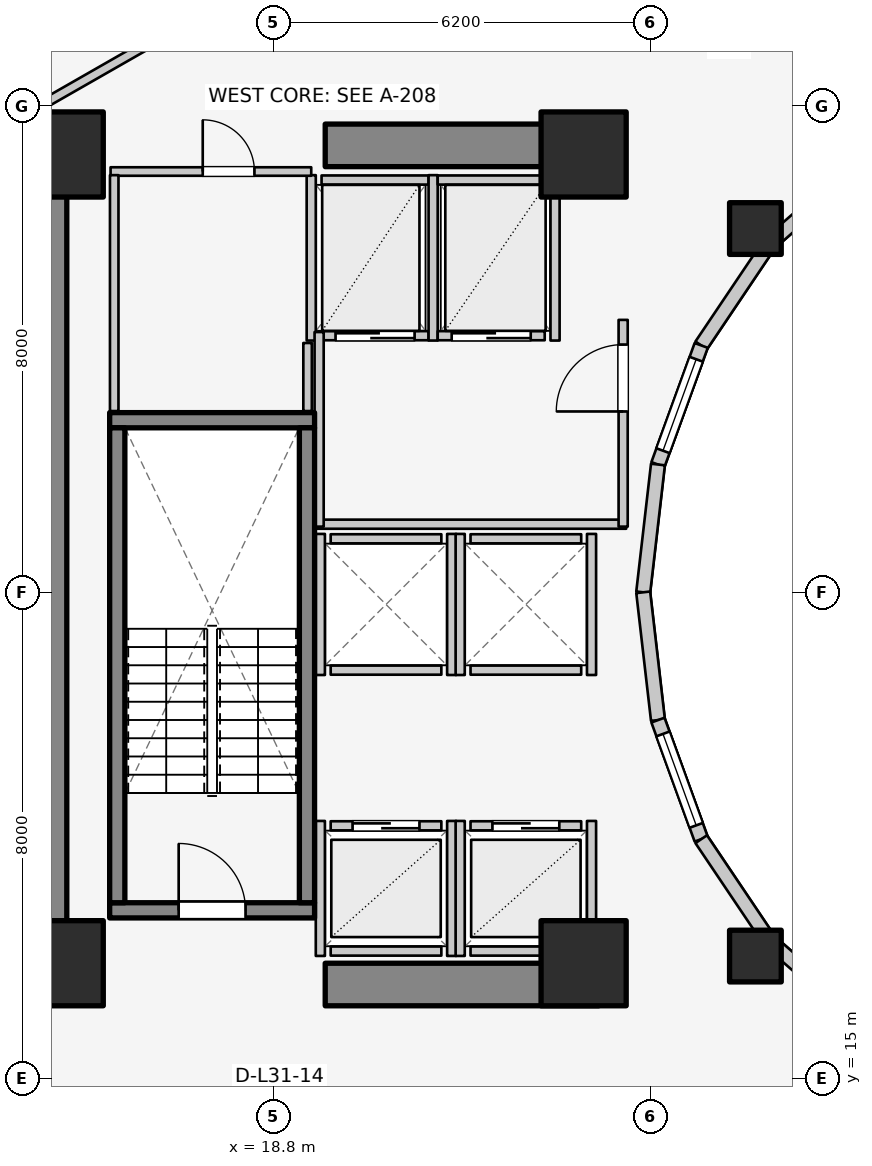
"""IFC4 building model, lengths in metres.
Left out: names, types, materials, properties, quantities, classifications, styles, units other than length and angle.
Written with IfcOpenShell. Run it as: python <this file> out.ifc"""

import sys

from ifc_helpers import new_model, si_unit, direction, frame, frame_2d, origin, origin_2d, place, context, subcontext, project, spatial, rectangle, extrude, element, fill, save


model = new_model("IFC4")
c1 = context("Model", 3, precision=1e-05, world=origin(), true_north=direction((0.0, 1.0)))
c2 = subcontext(c1, "Body", "Model", "MODEL_VIEW")
j1 = project(units=[si_unit("LENGTHUNIT", "METRE"), si_unit("PLANEANGLEUNIT", "RADIAN")], contexts=[c1])
p1 = place(None, origin())
s1 = spatial("IfcSite", under=j1, at=p1, CompositionType="ELEMENT")
p2 = place(p1, origin())
s2 = spatial("IfcBuilding", under=s1, at=p2, CompositionType="ELEMENT")
p3 = place(p2, frame((0.0, 0.0, 104.2)))
s3 = spatial("IfcBuildingStorey", under=s2, at=p3, CompositionType="ELEMENT", Elevation=104.2)
p4 = place(p3, frame((15.05, 17.05, 0.0), z_axis=(0.0, 0.0, 1.0), x_axis=(0.0, 1.0, 0.0)))
e1 = element("IfcWall", 1, at=p4, inside=s3, PredefinedType="SHEAR", context=c2, shape_type="SweptSolid", body=[
    extrude(rectangle(XDim=12.8, YDim=0.7, at=frame_2d((6.4, 0.0))), origin(), (0.0, 0.0, 1.0), 3.1),
])
for number, where, z_axis, x_axis in (
    (2, (19.65, 16.55, 0.0), (0.0, 0.0, 1.0), (1.0, 0.0, 0.0)),
    (3, (19.65, 30.35, 0.0), (0.0, 0.0, 1.0), (1.0, 0.0, 0.0)),
):
    element("IfcWall", number, at=place(p3, frame(where, z_axis=z_axis, x_axis=x_axis)), inside=s3, PredefinedType="SHEAR", context=c2, shape_type="SweptSolid", body=[
        extrude(rectangle(XDim=4.5, YDim=0.7, at=frame_2d((2.25, 0.0))), origin(), (0.0, 0.0, 1.0), 3.1),
    ])
p5 = place(p3, frame((16.105, 17.77, 0.0), z_axis=(0.0, 0.0, 1.0), x_axis=(1.0, 0.0, 0.0)))
e4 = element("IfcWall", 4, at=p5, inside=s3, PredefinedType="SOLIDWALL", context=c2, shape_type="SweptSolid", body=[
    extrude(rectangle(XDim=3.37, YDim=0.25, at=frame_2d((1.685, 0.0))), origin(), (0.0, 0.0, 1.0), 3.1),
])
p6 = place(p5, frame((1.135, 0.0, 0.0)))
e5 = element("IfcOpeningElement", 5, at=p6, cuts=e4, PredefinedType="OPENING", context=c2, shape_type="SweptSolid", body=[
    extrude(rectangle(XDim=1.1, YDim=2.1, at=frame_2d((0.55, 1.05))), frame((0.0, 0.135, 0.0), z_axis=(0.0, -1.0, 0.0), x_axis=(1.0, 0.0, 0.0)), (0.0, 0.0, 1.0), 0.27),
])
p7 = place(p3, frame((16.105, 25.83, 0.0), z_axis=(0.0, 0.0, 1.0), x_axis=(1.0, 0.0, 0.0)))
e6 = element("IfcWall", 6, at=p7, inside=s3, PredefinedType="SOLIDWALL", context=c2, shape_type="SweptSolid", body=[
    extrude(rectangle(XDim=3.37, YDim=0.25, at=frame_2d((1.685, 0.0))), origin(), (0.0, 0.0, 1.0), 3.1),
])
for number, where, z_axis, x_axis in (
    (7, (16.23, 17.895, 0.0), (0.0, 0.0, 1.0), (0.0, 1.0, 0.0)),
    (8, (19.35, 17.895, 0.0), (0.0, 0.0, 1.0), (0.0, 1.0, 0.0)),
):
    element("IfcWall", number, at=place(p3, frame(where, z_axis=z_axis, x_axis=x_axis)), inside=s3, PredefinedType="SOLIDWALL", context=c2, shape_type="SweptSolid", body=[
        extrude(rectangle(XDim=7.81, YDim=0.25, at=frame_2d((3.905, 0.0))), origin(), (0.0, 0.0, 1.0), 3.1),
    ])
for number, where, z_axis, x_axis in (
    (9, (15.3, 16.9, 0.0), (0.0, 0.0, 1.0), (1.0, 0.0, 0.0)),
    (10, (23.9, 16.9, 0.0), (0.0, 0.0, 1.0), (1.0, 0.0, 0.0)),
    (11, (23.9, 30.2, 0.0), (0.0, 0.0, 1.0), (1.0, 0.0, 0.0)),
    (12, (15.3, 30.2, 0.0), (0.0, 0.0, 1.0), (1.0, 0.0, 0.0)),
):
    element("IfcColumn", number, at=place(p3, frame(where, z_axis=z_axis, x_axis=x_axis)), inside=s3, PredefinedType="COLUMN", context=c2, shape_type="SweptSolid", body=[
        extrude(rectangle(XDim=1.4, YDim=1.4, at=origin_2d()), origin(), (0.0, 0.0, 1.0), 3.1),
    ])
for number, where, z_axis, x_axis in (
    (13, (26.725, 28.982, 0.0), (0.0, 0.0, 1.0), (1.0, 0.0, 0.0)),
    (14, (26.725, 17.018, 0.0), (0.0, 0.0, 1.0), (1.0, 0.0, 0.0)),
):
    element("IfcColumn", number, at=place(p3, frame(where, z_axis=z_axis, x_axis=x_axis)), inside=s3, PredefinedType="COLUMN", context=c2, shape_type="SweptSolid", body=[
        extrude(rectangle(XDim=0.85, YDim=0.85, at=origin_2d()), origin(), (0.0, 0.0, 1.0), 3.1),
    ])
p8 = place(p3, frame((28.44, 30.032, 0.0), z_axis=(0.0, 0.0, 1.0), x_axis=(-0.752576694707, -0.658504607869, 0.0)))
e15 = element("IfcWall", 15, at=p8, inside=s3, PredefinedType="STANDARD", context=c2, shape_type="SweptSolid", body=[
    extrude(rectangle(XDim=1.959, YDim=0.23, at=frame_2d((0.98, 0.0))), origin(), (0.0, 0.0, 1.0), 2.16),
])
p9 = place(p3, frame((26.965, 28.742, 0.0), z_axis=(0.0, 0.0, 1.0), x_axis=(-0.558197800898, -0.829707909492, 0.0)))
e16 = element("IfcWall", 16, at=p9, inside=s3, PredefinedType="STANDARD", context=c2, shape_type="SweptSolid", body=[
    extrude(rectangle(XDim=2.027, YDim=0.23, at=frame_2d((1.013, 0.0))), origin(), (0.0, 0.0, 1.0), 2.16),
])
p10 = place(p3, frame((25.834, 27.06, 0.0), z_axis=(0.0, 0.0, 1.0), x_axis=(-0.341423187295, -0.93990968033, 0.0)))
e17 = element("IfcWall", 17, at=p10, inside=s3, PredefinedType="STANDARD", context=c2, shape_type="SweptSolid", body=[
    extrude(rectangle(XDim=2.084, YDim=0.23, at=frame_2d((1.042, 0.0))), origin(), (0.0, 0.0, 1.0), 2.84),
])
p11 = place(p10, frame((0.242, 0.0, 0.85)))
e18 = element("IfcOpeningElement", 18, at=p11, cuts=e17, PredefinedType="OPENING", context=c2, shape_type="SweptSolid", body=[
    extrude(rectangle(XDim=1.6, YDim=1.65, at=frame_2d((0.8, 0.825))), frame((0.0, 0.125, 0.0), z_axis=(0.0, -1.0, 0.0), x_axis=(1.0, 0.0, 0.0)), (0.0, 0.0, 1.0), 0.25),
])
for number, where, z_axis, x_axis in (
    (19, (25.123, 25.102, 0.0), (0.0, 0.0, 1.0), (-0.115, -0.993, 0.0)),
    (20, (24.88, 23.0, 0.0), (0.0, 0.0, 1.0), (0.115, -0.993, 0.0)),
):
    element("IfcWall", number, at=place(p3, frame(where, z_axis=z_axis, x_axis=x_axis)), inside=s3, PredefinedType="STANDARD", context=c2, shape_type="SweptSolid", body=[
        extrude(rectangle(XDim=2.115, YDim=0.23, at=frame_2d((1.058, 0.0))), origin(), (0.0, 0.0, 1.0), 2.84),
    ])
p12 = place(p3, frame((25.123, 20.898, 0.0), z_axis=(0.0, 0.0, 1.0), x_axis=(0.341423187295, -0.93990968033, 0.0)))
e21 = element("IfcWall", 21, at=p12, inside=s3, PredefinedType="STANDARD", context=c2, shape_type="SweptSolid", body=[
    extrude(rectangle(XDim=2.084, YDim=0.23, at=frame_2d((1.042, 0.0))), origin(), (0.0, 0.0, 1.0), 2.84),
])
p13 = place(p12, frame((0.242, 0.0, 0.85)))
e22 = element("IfcOpeningElement", 22, at=p13, cuts=e21, PredefinedType="OPENING", context=c2, shape_type="SweptSolid", body=[
    extrude(rectangle(XDim=1.6, YDim=1.65, at=frame_2d((0.8, 0.825))), frame((0.0, 0.125, 0.0), z_axis=(0.0, -1.0, 0.0), x_axis=(1.0, 0.0, 0.0)), (0.0, 0.0, 1.0), 0.25),
])
p14 = place(p3, frame((25.834, 18.94, 0.0), z_axis=(0.0, 0.0, 1.0), x_axis=(0.558197800898, -0.829707909492, 0.0)))
e23 = element("IfcWall", 23, at=p14, inside=s3, PredefinedType="STANDARD", context=c2, shape_type="SweptSolid", body=[
    extrude(rectangle(XDim=2.027, YDim=0.23, at=frame_2d((1.013, 0.0))), origin(), (0.0, 0.0, 1.0), 2.16),
])
p15 = place(p3, frame((26.965, 17.258, 0.0), z_axis=(0.0, 0.0, 1.0), x_axis=(0.752576694707, -0.658504607869, 0.0)))
e24 = element("IfcWall", 24, at=p15, inside=s3, PredefinedType="STANDARD", context=c2, shape_type="SweptSolid", body=[
    extrude(rectangle(XDim=1.959, YDim=0.23, at=frame_2d((0.98, 0.0))), origin(), (0.0, 0.0, 1.0), 2.16),
])
p16 = place(p3, frame((19.74, 19.16, 0.0), z_axis=(0.0, 0.0, 1.0), x_axis=(1.0, 0.0, 0.0)))
e25 = element("IfcWall", 25, at=p16, inside=s3, PredefinedType="SOLIDWALL", context=c2, shape_type="SweptSolid", body=[
    extrude(rectangle(XDim=1.82, YDim=0.15, at=frame_2d((0.91, 0.0))), origin(), (0.0, 0.0, 1.0), 2.855),
])
p17 = place(p16, frame((0.36, 0.0, 0.0)))
e26 = element("IfcOpeningElement", 26, at=p17, cuts=e25, PredefinedType="OPENING", context=c2, shape_type="SweptSolid", body=[
    extrude(rectangle(XDim=1.1, YDim=2.1, at=frame_2d((0.55, 1.05))), frame((0.0, 0.085, 0.0), z_axis=(0.0, -1.0, 0.0), x_axis=(1.0, 0.0, 0.0)), (0.0, 0.0, 1.0), 0.17),
])
p18 = place(p3, frame((19.74, 17.1, 0.0), z_axis=(0.0, 0.0, 1.0), x_axis=(1.0, 0.0, 0.0)))
e27 = element("IfcWall", 27, at=p18, inside=s3, PredefinedType="SOLIDWALL", context=c2, shape_type="SweptSolid", body=[
    extrude(rectangle(XDim=1.82, YDim=0.15, at=frame_2d((0.91, 0.0))), origin(), (0.0, 0.0, 1.0), 2.855),
])
p19 = place(p3, frame((19.57, 17.02, 0.0), z_axis=(0.0, 0.0, 1.0), x_axis=(0.0, 1.0, 0.0)))
e28 = element("IfcWall", 28, at=p19, inside=s3, PredefinedType="SOLIDWALL", context=c2, shape_type="SweptSolid", body=[
    extrude(rectangle(XDim=2.22, YDim=0.15, at=frame_2d((1.11, 0.0))), origin(), (0.0, 0.0, 1.0), 2.12),
])
p20 = place(p3, frame((21.73, 17.02, 0.0), z_axis=(0.0, 0.0, 1.0), x_axis=(0.0, 1.0, 0.0)))
e29 = element("IfcWall", 29, at=p20, inside=s3, PredefinedType="SOLIDWALL", context=c2, shape_type="SweptSolid", body=[
    extrude(rectangle(XDim=2.22, YDim=0.15, at=frame_2d((1.11, 0.0))), origin(), (0.0, 0.0, 1.0), 2.855),
])
p21 = place(p3, frame((22.04, 19.16, 0.0), z_axis=(0.0, 0.0, 1.0), x_axis=(1.0, 0.0, 0.0)))
e30 = element("IfcWall", 30, at=p21, inside=s3, PredefinedType="SOLIDWALL", context=c2, shape_type="SweptSolid", body=[
    extrude(rectangle(XDim=1.82, YDim=0.15, at=frame_2d((0.91, 0.0))), origin(), (0.0, 0.0, 1.0), 2.12),
])
p22 = place(p21, frame((0.36, 0.0, 0.0)))
e31 = element("IfcOpeningElement", 31, at=p22, cuts=e30, PredefinedType="OPENING", context=c2, shape_type="SweptSolid", body=[
    extrude(rectangle(XDim=1.1, YDim=2.1, at=frame_2d((0.55, 1.05))), frame((0.0, 0.085, 0.0), z_axis=(0.0, -1.0, 0.0), x_axis=(1.0, 0.0, 0.0)), (0.0, 0.0, 1.0), 0.17),
])
p23 = place(p3, frame((22.04, 17.1, 0.0), z_axis=(0.0, 0.0, 1.0), x_axis=(1.0, 0.0, 0.0)))
e32 = element("IfcWall", 32, at=p23, inside=s3, PredefinedType="SOLIDWALL", context=c2, shape_type="SweptSolid", body=[
    extrude(rectangle(XDim=1.82, YDim=0.15, at=frame_2d((0.91, 0.0))), origin(), (0.0, 0.0, 1.0), 2.12),
])
p24 = place(p3, frame((21.87, 17.02, 0.0), z_axis=(0.0, 0.0, 1.0), x_axis=(0.0, 1.0, 0.0)))
e33 = element("IfcWall", 33, at=p24, inside=s3, PredefinedType="SOLIDWALL", context=c2, shape_type="SweptSolid", body=[
    extrude(rectangle(XDim=2.22, YDim=0.15, at=frame_2d((1.11, 0.0))), origin(), (0.0, 0.0, 1.0), 2.855),
])
p25 = place(p3, frame((24.03, 17.02, 0.0), z_axis=(0.0, 0.0, 1.0), x_axis=(0.0, 1.0, 0.0)))
e34 = element("IfcWall", 34, at=p25, inside=s3, PredefinedType="SOLIDWALL", context=c2, shape_type="SweptSolid", body=[
    extrude(rectangle(XDim=2.22, YDim=0.15, at=frame_2d((1.11, 0.0))), origin(), (0.0, 0.0, 1.0), 2.12),
])
for number, where, z_axis, x_axis in (
    (35, (19.74, 21.72, 0.0), (0.0, 0.0, 1.0), (1.0, 0.0, 0.0)),
    (36, (19.74, 23.88, 0.0), (0.0, 0.0, 1.0), (1.0, 0.0, 0.0)),
):
    element("IfcWall", number, at=place(p3, frame(where, z_axis=z_axis, x_axis=x_axis)), inside=s3, PredefinedType="SOLIDWALL", context=c2, shape_type="SweptSolid", body=[
        extrude(rectangle(XDim=1.82, YDim=0.15, at=frame_2d((0.91, 0.0))), origin(), (0.0, 0.0, 1.0), 2.855),
    ])
for number, where, z_axis, x_axis in (
    (37, (19.57, 21.64, 0.0), (0.0, 0.0, 1.0), (0.0, 1.0, 0.0)),
    (38, (21.73, 21.64, 0.0), (0.0, 0.0, 1.0), (0.0, 1.0, 0.0)),
):
    element("IfcWall", number, at=place(p3, frame(where, z_axis=z_axis, x_axis=x_axis)), inside=s3, PredefinedType="SOLIDWALL", context=c2, shape_type="SweptSolid", body=[
        extrude(rectangle(XDim=2.32, YDim=0.15, at=frame_2d((1.16, 0.0))), origin(), (0.0, 0.0, 1.0), 2.855),
    ])
for number, where, z_axis, x_axis in (
    (39, (22.04, 21.72, 0.0), (0.0, 0.0, 1.0), (1.0, 0.0, 0.0)),
    (40, (22.04, 23.88, 0.0), (0.0, 0.0, 1.0), (1.0, 0.0, 0.0)),
):
    element("IfcWall", number, at=place(p3, frame(where, z_axis=z_axis, x_axis=x_axis)), inside=s3, PredefinedType="SOLIDWALL", context=c2, shape_type="SweptSolid", body=[
        extrude(rectangle(XDim=1.82, YDim=0.15, at=frame_2d((0.91, 0.0))), origin(), (0.0, 0.0, 1.0), 2.12),
    ])
p26 = place(p3, frame((21.87, 21.64, 0.0), z_axis=(0.0, 0.0, 1.0), x_axis=(0.0, 1.0, 0.0)))
e41 = element("IfcWall", 41, at=p26, inside=s3, PredefinedType="SOLIDWALL", context=c2, shape_type="SweptSolid", body=[
    extrude(rectangle(XDim=2.32, YDim=0.15, at=frame_2d((1.16, 0.0))), origin(), (0.0, 0.0, 1.0), 2.855),
])
p27 = place(p3, frame((24.03, 21.64, 0.0), z_axis=(0.0, 0.0, 1.0), x_axis=(0.0, 1.0, 0.0)))
e42 = element("IfcWall", 42, at=p27, inside=s3, PredefinedType="SOLIDWALL", context=c2, shape_type="SweptSolid", body=[
    extrude(rectangle(XDim=2.32, YDim=0.15, at=frame_2d((1.16, 0.0))), origin(), (0.0, 0.0, 1.0), 2.12),
])
p28 = place(p3, frame((19.59, 27.22, 0.0), z_axis=(0.0, 0.0, 1.0), x_axis=(1.0, 0.0, 0.0)))
e43 = element("IfcWall", 43, at=p28, inside=s3, PredefinedType="SOLIDWALL", context=c2, shape_type="SweptSolid", body=[
    extrude(rectangle(XDim=1.76, YDim=0.15, at=frame_2d((0.88, 0.0))), origin(), (0.0, 0.0, 1.0), 2.855),
])
p29 = place(p28, frame((0.23, 0.0, 0.0)))
e44 = element("IfcOpeningElement", 44, at=p29, cuts=e43, PredefinedType="OPENING", context=c2, shape_type="SweptSolid", body=[
    extrude(rectangle(XDim=1.3, YDim=2.1, at=frame_2d((0.65, 1.05))), frame((0.0, 0.085, 0.0), z_axis=(0.0, -1.0, 0.0), x_axis=(1.0, 0.0, 0.0)), (0.0, 0.0, 1.0), 0.17),
])
p30 = place(p3, frame((19.59, 29.78, 0.0), z_axis=(0.0, 0.0, 1.0), x_axis=(1.0, 0.0, 0.0)))
e45 = element("IfcWall", 45, at=p30, inside=s3, PredefinedType="SOLIDWALL", context=c2, shape_type="SweptSolid", body=[
    extrude(rectangle(XDim=1.76, YDim=0.15, at=frame_2d((0.88, 0.0))), origin(), (0.0, 0.0, 1.0), 2.855),
])
for number, where, z_axis, x_axis in (
    (46, (19.42, 27.14, 0.0), (0.0, 0.0, 1.0), (0.0, 1.0, 0.0)),
    (47, (21.425, 27.14, 0.0), (0.0, 0.0, 1.0), (0.0, 1.0, 0.0)),
):
    element("IfcWall", number, at=place(p3, frame(where, z_axis=z_axis, x_axis=x_axis)), inside=s3, PredefinedType="SOLIDWALL", context=c2, shape_type="SweptSolid", body=[
        extrude(rectangle(XDim=2.72, YDim=0.15, at=frame_2d((1.36, 0.0))), origin(), (0.0, 0.0, 1.0), 2.855),
    ])
p31 = place(p3, frame((21.5, 27.22, 0.0), z_axis=(0.0, 0.0, 1.0), x_axis=(1.0, 0.0, 0.0)))
e48 = element("IfcWall", 48, at=p31, inside=s3, PredefinedType="SOLIDWALL", context=c2, shape_type="SweptSolid", body=[
    extrude(rectangle(XDim=1.76, YDim=0.15, at=frame_2d((0.88, 0.0))), origin(), (0.0, 0.0, 1.0), 2.855),
])
p32 = place(p31, frame((0.23, 0.0, 0.0)))
e49 = element("IfcOpeningElement", 49, at=p32, cuts=e48, PredefinedType="OPENING", context=c2, shape_type="SweptSolid", body=[
    extrude(rectangle(XDim=1.3, YDim=2.1, at=frame_2d((0.65, 1.05))), frame((0.0, 0.085, 0.0), z_axis=(0.0, -1.0, 0.0), x_axis=(1.0, 0.0, 0.0)), (0.0, 0.0, 1.0), 0.17),
])
p33 = place(p3, frame((21.5, 29.78, 0.0), z_axis=(0.0, 0.0, 1.0), x_axis=(1.0, 0.0, 0.0)))
e50 = element("IfcWall", 50, at=p33, inside=s3, PredefinedType="SOLIDWALL", context=c2, shape_type="SweptSolid", body=[
    extrude(rectangle(XDim=1.76, YDim=0.15, at=frame_2d((0.88, 0.0))), origin(), (0.0, 0.0, 1.0), 2.855),
])
p34 = place(p3, frame((23.43, 27.14, 0.0), z_axis=(0.0, 0.0, 1.0), x_axis=(0.0, 1.0, 0.0)))
e51 = element("IfcWall", 51, at=p34, inside=s3, PredefinedType="SOLIDWALL", context=c2, shape_type="SweptSolid", body=[
    extrude(rectangle(XDim=2.72, YDim=0.15, at=frame_2d((1.36, 0.0))), origin(), (0.0, 0.0, 1.0), 2.855),
])
p35 = place(p3, frame((19.52, 24.12, 0.0), z_axis=(0.0, 0.0, 1.0), x_axis=(1.0, 0.0, 0.0)))
e52 = element("IfcWall", 52, at=p35, inside=s3, PredefinedType="PARTITIONING", context=c2, shape_type="SweptSolid", body=[
    extrude(rectangle(XDim=5.08, YDim=0.15, at=frame_2d((2.54, 0.0))), origin(), (0.0, 0.0, 1.0), 2.12),
])
p36 = place(p3, frame((19.55, 24.08, 0.0), z_axis=(0.0, 0.0, 1.0), x_axis=(0.0, 1.0, 0.0)))
e53 = element("IfcWall", 53, at=p36, inside=s3, PredefinedType="PARTITIONING", context=c2, shape_type="SweptSolid", body=[
    extrude(rectangle(XDim=3.2, YDim=0.15, at=frame_2d((1.6, 0.0))), origin(), (0.0, 0.0, 1.0), 2.855),
])
p37 = place(p3, frame((24.55, 24.08, 0.0), z_axis=(0.0, 0.0, 1.0), x_axis=(0.0, 1.0, 0.0)))
e54 = element("IfcWall", 54, at=p37, inside=s3, PredefinedType="PARTITIONING", context=c2, shape_type="SweptSolid", body=[
    extrude(rectangle(XDim=3.4, YDim=0.15, at=frame_2d((1.7, 0.0))), origin(), (0.0, 0.0, 1.0), 2.855),
])
p38 = place(p37, frame((1.894, 0.0, 0.0)))
e55 = element("IfcOpeningElement", 55, at=p38, cuts=e54, PredefinedType="OPENING", context=c2, shape_type="SweptSolid", body=[
    extrude(rectangle(XDim=1.1, YDim=2.1, at=frame_2d((0.55, 1.05))), frame((0.0, 0.085, 0.0), z_axis=(0.0, -1.0, 0.0), x_axis=(1.0, 0.0, 0.0)), (0.0, 0.0, 1.0), 0.17),
])
p39 = place(p3, frame((16.12, 29.92, 0.0), z_axis=(0.0, 0.0, 1.0), x_axis=(1.0, 0.0, 0.0)))
e56 = element("IfcWall", 56, at=p39, inside=s3, PredefinedType="PLUMBINGWALL", context=c2, shape_type="SweptSolid", body=[
    extrude(rectangle(XDim=3.3, YDim=0.14, at=frame_2d((1.65, 0.0))), origin(), (0.0, 0.0, 1.0), 2.855),
])
p40 = place(p39, frame((1.516, 0.0, 0.0)))
e57 = element("IfcOpeningElement", 57, at=p40, cuts=e56, PredefinedType="OPENING", context=c2, shape_type="SweptSolid", body=[
    extrude(rectangle(XDim=0.85, YDim=2.05, at=frame_2d((0.425, 1.025))), frame((0.0, 0.08, 0.0), z_axis=(0.0, -1.0, 0.0), x_axis=(1.0, 0.0, 0.0)), (0.0, 0.0, 1.0), 0.16),
])
p41 = place(p3, frame((16.18, 25.98, 0.0), z_axis=(0.0, 0.0, 1.0), x_axis=(0.0, 1.0, 0.0)))
e58 = element("IfcWall", 58, at=p41, inside=s3, PredefinedType="PLUMBINGWALL", context=c2, shape_type="SweptSolid", body=[
    extrude(rectangle(XDim=3.88, YDim=0.14, at=frame_2d((1.94, 0.0))), origin(), (0.0, 0.0, 1.0), 2.855),
])
p42 = place(p3, frame((19.36, 25.98, 0.0), z_axis=(0.0, 0.0, 1.0), x_axis=(0.0, 1.0, 0.0)))
e59 = element("IfcWall", 59, at=p42, inside=s3, PredefinedType="PLUMBINGWALL", context=c2, shape_type="SweptSolid", body=[
    extrude(rectangle(XDim=1.12, YDim=0.14, at=frame_2d((0.56, 0.0))), origin(), (0.0, 0.0, 1.0), 2.855),
])
p43 = place(p3, frame((17.243, 32.305, 0.0), z_axis=(0.0, 0.0, 1.0), x_axis=(-0.867991349648, -0.496579315857, 0.0)))
e60 = element("IfcWall", 60, at=p43, inside=s3, PredefinedType="PARTITIONING", context=c2, shape_type="SweptSolid", body=[
    extrude(rectangle(XDim=2.567, YDim=0.15, at=frame_2d((1.283, 0.0))), origin(), (0.0, 0.0, 1.0), 2.142),
])
p44 = place(p11, origin())
e61 = element("IfcWindow", 61, at=p44, inside=s3, PartitioningType="SINGLE_PANEL", PredefinedType="WINDOW", context=c2, shape_type="SweptSolid", body=[
    extrude(rectangle(XDim=1.6, YDim=1.65, at=frame_2d((0.8, 0.825))), frame((0.0, 0.03, 0.0), z_axis=(0.0, -1.0, 0.0), x_axis=(1.0, 0.0, 0.0)), (0.0, 0.0, 1.0), 0.06),
])
fill(e18, e61)
p45 = place(p13, origin())
e62 = element("IfcWindow", 62, at=p45, inside=s3, PartitioningType="SINGLE_PANEL", PredefinedType="WINDOW", context=c2, shape_type="SweptSolid", body=[
    extrude(rectangle(XDim=1.6, YDim=1.65, at=frame_2d((0.8, 0.825))), frame((0.0, 0.03, 0.0), z_axis=(0.0, -1.0, 0.0), x_axis=(1.0, 0.0, 0.0)), (0.0, 0.0, 1.0), 0.06),
])
fill(e22, e62)
p46 = place(p6, origin())
e63 = element("IfcDoor", 63, at=p46, inside=s3, OperationType="SINGLE_SWING_LEFT", PredefinedType="DOOR", context=c2, shape_type="SweptSolid", body=[
    extrude(rectangle(XDim=1.1, YDim=2.1, at=frame_2d((0.55, 1.05))), frame((0.0, 0.025, 0.0), z_axis=(0.0, -1.0, 0.0), x_axis=(1.0, 0.0, 0.0)), (0.0, 0.0, 1.0), 0.05),
])
fill(e5, e63)
p47 = place(p17, origin())
e64 = element("IfcDoor", 64, at=p47, inside=s3, OperationType="DOUBLE_DOOR_SLIDING", PredefinedType="DOOR", context=c2, shape_type="SweptSolid", body=[
    extrude(rectangle(XDim=1.1, YDim=2.1, at=frame_2d((0.55, 1.05))), frame((0.0, 0.025, 0.0), z_axis=(0.0, -1.0, 0.0), x_axis=(1.0, 0.0, 0.0)), (0.0, 0.0, 1.0), 0.05),
])
fill(e26, e64)
p48 = place(p22, origin())
e65 = element("IfcDoor", 65, at=p48, inside=s3, OperationType="DOUBLE_DOOR_SLIDING", PredefinedType="DOOR", context=c2, shape_type="SweptSolid", body=[
    extrude(rectangle(XDim=1.1, YDim=2.1, at=frame_2d((0.55, 1.05))), frame((0.0, 0.025, 0.0), z_axis=(0.0, -1.0, 0.0), x_axis=(1.0, 0.0, 0.0)), (0.0, 0.0, 1.0), 0.05),
])
fill(e31, e65)
p49 = place(p29, origin())
e66 = element("IfcDoor", 66, at=p49, inside=s3, OperationType="DOUBLE_DOOR_SLIDING", PredefinedType="DOOR", context=c2, shape_type="SweptSolid", body=[
    extrude(rectangle(XDim=1.3, YDim=2.1, at=frame_2d((0.65, 1.05))), frame((0.0, 0.025, 0.0), z_axis=(0.0, -1.0, 0.0), x_axis=(1.0, 0.0, 0.0)), (0.0, 0.0, 1.0), 0.05),
])
fill(e44, e66)
p50 = place(p32, origin())
e67 = element("IfcDoor", 67, at=p50, inside=s3, OperationType="DOUBLE_DOOR_SLIDING", PredefinedType="DOOR", context=c2, shape_type="SweptSolid", body=[
    extrude(rectangle(XDim=1.3, YDim=2.1, at=frame_2d((0.65, 1.05))), frame((0.0, 0.025, 0.0), z_axis=(0.0, -1.0, 0.0), x_axis=(1.0, 0.0, 0.0)), (0.0, 0.0, 1.0), 0.05),
])
fill(e49, e67)
p51 = place(p38, origin())
e68 = element("IfcDoor", 68, at=p51, inside=s3, OperationType="SINGLE_SWING_LEFT", PredefinedType="DOOR", context=c2, shape_type="SweptSolid", body=[
    extrude(rectangle(XDim=1.1, YDim=2.1, at=frame_2d((0.55, 1.05))), frame((0.0, 0.025, 0.0), z_axis=(0.0, -1.0, 0.0), x_axis=(1.0, 0.0, 0.0)), (0.0, 0.0, 1.0), 0.05),
])
fill(e55, e68)
p52 = place(p40, origin())
e69 = element("IfcDoor", 69, at=p52, inside=s3, OperationType="SINGLE_SWING_LEFT", PredefinedType="DOOR", context=c2, shape_type="SweptSolid", body=[
    extrude(rectangle(XDim=0.85, YDim=2.05, at=frame_2d((0.425, 1.025))), frame((0.0, 0.025, 0.0), z_axis=(0.0, -1.0, 0.0), x_axis=(1.0, 0.0, 0.0)), (0.0, 0.0, 1.0), 0.05),
])
fill(e57, e69)
save(model, sys.argv[1])
